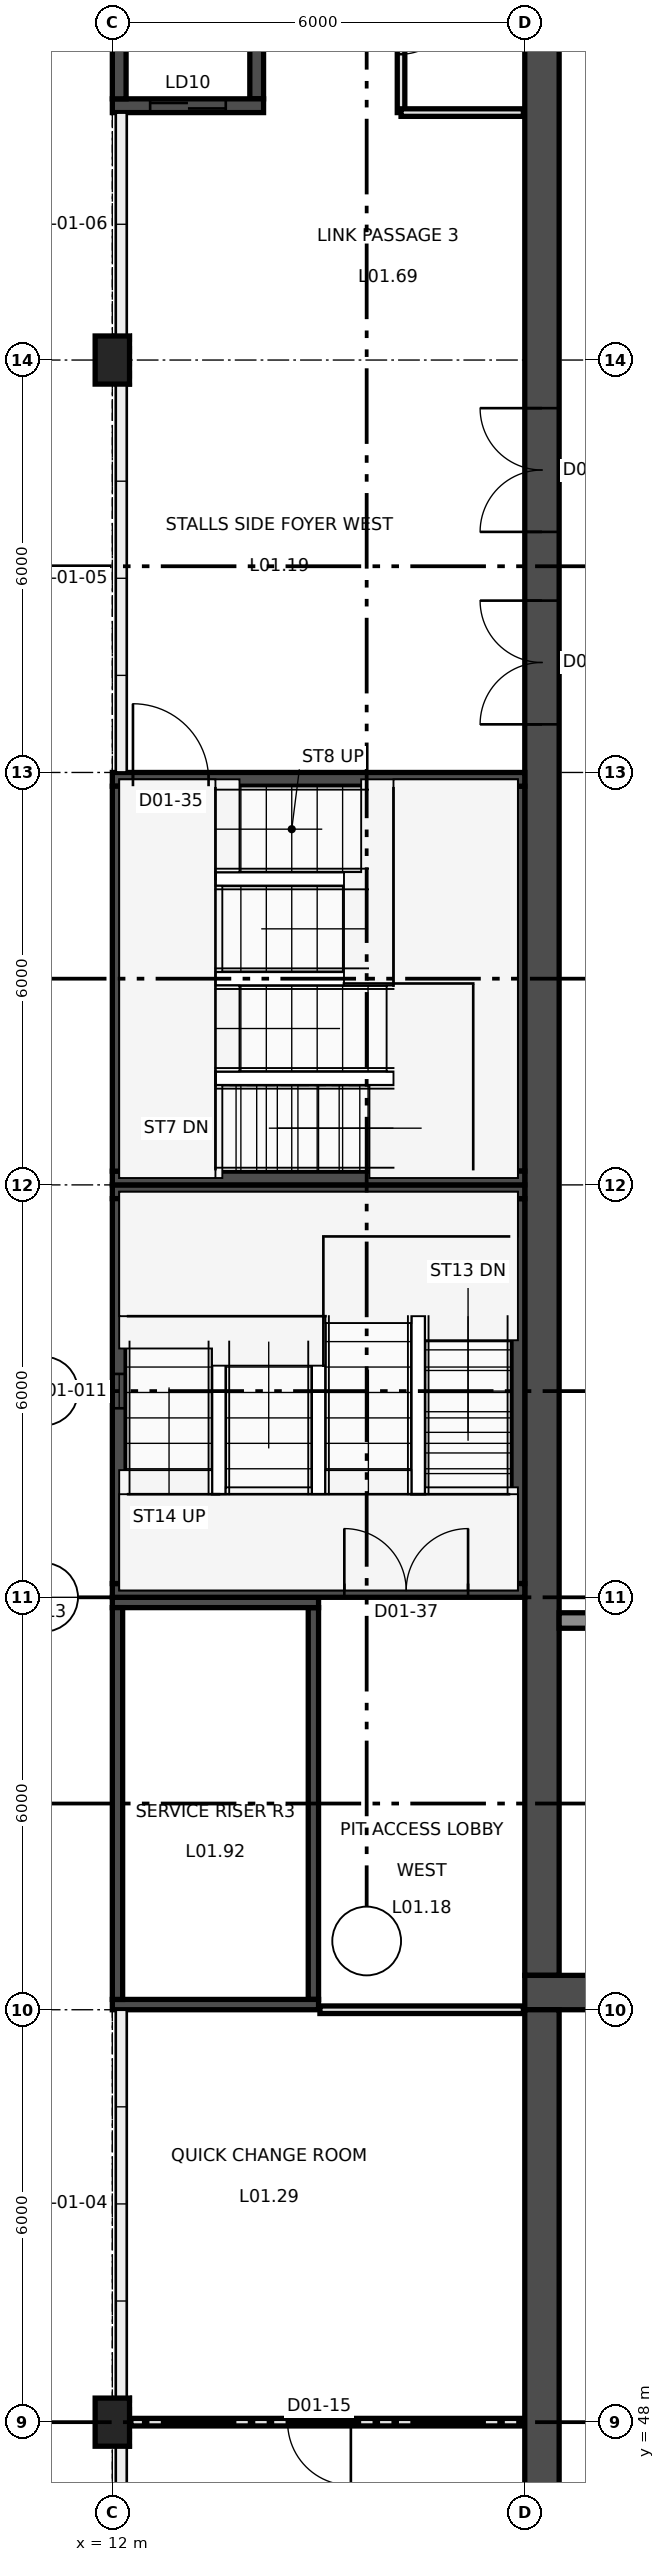
"""IFC4 building model, lengths in metres.
Left out: names, types, materials, properties, quantities, classifications, styles, units other than length and angle.
Written with IfcOpenShell. Run it as: python <this file> out.ifc"""

import sys

from ifc_helpers import new_model, si_unit, direction, frame, frame_2d, origin, origin_2d, place, context, subcontext, project, spatial, rectangle, extrude, element, fill, save


model = new_model("IFC4")
c1 = context("Model", 3, precision=1e-05, world=origin(), true_north=direction((0.0, 1.0)))
c2 = subcontext(c1, "Body", "Model", "MODEL_VIEW")
j1 = project(units=[si_unit("LENGTHUNIT", "METRE"), si_unit("PLANEANGLEUNIT", "RADIAN")], contexts=[c1])
p1 = place(None, origin())
s1 = spatial("IfcSite", under=j1, at=p1, CompositionType="ELEMENT")
p2 = place(p1, origin())
s2 = spatial("IfcBuilding", under=s1, at=p2, CompositionType="ELEMENT")
p3 = place(p2, frame((0.0, 0.0, 7.0)))
s3 = spatial("IfcBuildingStorey", under=s2, at=p3, CompositionType="ELEMENT", Elevation=7.0)
for number, where, z_axis, x_axis in (
    (1, (12.0, 48.0, 0.0), (0.0, 0.0, 1.0), (1.0, 0.0, 0.0)),
    (2, (12.0, 78.0, 0.0), (0.0, 0.0, 1.0), (1.0, 0.0, 0.0)),
):
    element("IfcColumn", number, at=place(p3, frame(where, z_axis=z_axis, x_axis=x_axis)), inside=s3, PredefinedType="COLUMN", context=c2, shape_type="SweptSolid", body=[
        extrude(rectangle(XDim=0.5, YDim=0.7, at=origin_2d()), origin(), (0.0, 0.0, 1.0), 5.0),
    ])
p4 = place(p3, frame((12.0, 71.9, 0.0), z_axis=(0.0, 0.0, 1.0), x_axis=(1.0, 0.0, 0.0)))
e3 = element("IfcWall", 3, at=p4, inside=s3, PredefinedType="SHEAR", context=c2, shape_type="SweptSolid", body=[
    extrude(rectangle(XDim=6.0, YDim=0.2, at=frame_2d((3.0, 0.0))), origin(), (0.0, 0.0, 1.0), 5.0),
])
p5 = place(p4, frame((0.3, 0.0, 0.0)))
e4 = element("IfcOpeningElement", 4, at=p5, cuts=e3, PredefinedType="OPENING", context=c2, shape_type="SweptSolid", body=[
    extrude(rectangle(XDim=1.1, YDim=2.2, at=frame_2d((0.55, 1.1))), frame((0.0, 0.11, 0.0), z_axis=(0.0, -1.0, 0.0), x_axis=(1.0, 0.0, 0.0)), (0.0, 0.0, 1.0), 0.22),
])
p6 = place(p3, frame((12.0, 66.1, 0.0), z_axis=(0.0, 0.0, 1.0), x_axis=(1.0, 0.0, 0.0)))
e5 = element("IfcWall", 5, at=p6, inside=s3, PredefinedType="SHEAR", context=c2, shape_type="SweptSolid", body=[
    extrude(rectangle(XDim=6.0, YDim=0.2, at=frame_2d((3.0, 0.0))), origin(), (0.0, 0.0, 1.0), 5.0),
])
for number, where, z_axis, x_axis in (
    (6, (12.1, 66.2, 0.0), (0.0, 0.0, 1.0), (0.0, 1.0, 0.0)),
    (7, (17.9, 66.2, 0.0), (0.0, 0.0, 1.0), (0.0, 1.0, 0.0)),
):
    element("IfcWall", number, at=place(p3, frame(where, z_axis=z_axis, x_axis=x_axis)), inside=s3, PredefinedType="SHEAR", context=c2, shape_type="SweptSolid", body=[
        extrude(rectangle(XDim=5.6, YDim=0.2, at=frame_2d((2.8, 0.0))), origin(), (0.0, 0.0, 1.0), 5.0),
    ])
p7 = place(p3, frame((12.0, 65.9, 0.0), z_axis=(0.0, 0.0, 1.0), x_axis=(1.0, 0.0, 0.0)))
e8 = element("IfcWall", 8, at=p7, inside=s3, PredefinedType="SHEAR", context=c2, shape_type="SweptSolid", body=[
    extrude(rectangle(XDim=6.0, YDim=0.2, at=frame_2d((3.0, 0.0))), origin(), (0.0, 0.0, 1.0), 5.0),
])
p8 = place(p3, frame((12.0, 60.1, 0.0), z_axis=(0.0, 0.0, 1.0), x_axis=(1.0, 0.0, 0.0)))
e9 = element("IfcWall", 9, at=p8, inside=s3, PredefinedType="SHEAR", context=c2, shape_type="SweptSolid", body=[
    extrude(rectangle(XDim=6.0, YDim=0.2, at=frame_2d((3.0, 0.0))), origin(), (0.0, 0.0, 1.0), 5.0),
])
p9 = place(p8, frame((3.375, 0.0, 0.0)))
e10 = element("IfcOpeningElement", 10, at=p9, cuts=e9, PredefinedType="OPENING", context=c2, shape_type="SweptSolid", body=[
    extrude(rectangle(XDim=1.8, YDim=2.2, at=frame_2d((0.9, 1.1))), frame((0.0, 0.11, 0.0), z_axis=(0.0, -1.0, 0.0), x_axis=(1.0, 0.0, 0.0)), (0.0, 0.0, 1.0), 0.22),
])
p10 = place(p3, frame((12.1, 60.2, 0.0), z_axis=(0.0, 0.0, 1.0), x_axis=(0.0, 1.0, 0.0)))
e11 = element("IfcWall", 11, at=p10, inside=s3, PredefinedType="SHEAR", context=c2, shape_type="SweptSolid", body=[
    extrude(rectangle(XDim=5.6, YDim=0.2, at=frame_2d((2.8, 0.0))), origin(), (0.0, 0.0, 1.0), 5.0),
])
p11 = place(p10, frame((2.55, 0.0, 0.9)))
e12 = element("IfcOpeningElement", 12, at=p11, cuts=e11, PredefinedType="OPENING", context=c2, shape_type="SweptSolid", body=[
    extrude(rectangle(XDim=0.5, YDim=2.1, at=frame_2d((0.25, 1.05))), frame((0.0, 0.11, 0.0), z_axis=(0.0, -1.0, 0.0), x_axis=(1.0, 0.0, 0.0)), (0.0, 0.0, 1.0), 0.22),
])
p12 = place(p3, frame((17.9, 60.2, 0.0), z_axis=(0.0, 0.0, 1.0), x_axis=(0.0, 1.0, 0.0)))
e13 = element("IfcWall", 13, at=p12, inside=s3, PredefinedType="SHEAR", context=c2, shape_type="SweptSolid", body=[
    extrude(rectangle(XDim=5.6, YDim=0.2, at=frame_2d((2.8, 0.0))), origin(), (0.0, 0.0, 1.0), 5.0),
])
p13 = place(p3, frame((12.0, 81.7, 0.0), z_axis=(0.0, 0.0, 1.0), x_axis=(1.0, 0.0, 0.0)))
e14 = element("IfcWall", 14, at=p13, inside=s3, PredefinedType="SHEAR", context=c2, shape_type="SweptSolid", body=[
    extrude(rectangle(XDim=2.2, YDim=0.2, at=frame_2d((1.1, 0.0))), origin(), (0.0, 0.0, 1.0), 5.0),
])
p14 = place(p13, frame((0.55, 0.0, 0.0)))
e15 = element("IfcOpeningElement", 15, at=p14, cuts=e14, PredefinedType="OPENING", context=c2, shape_type="SweptSolid", body=[
    extrude(rectangle(XDim=1.1, YDim=2.1, at=frame_2d((0.55, 1.05))), frame((0.0, 0.11, 0.0), z_axis=(0.0, -1.0, 0.0), x_axis=(1.0, 0.0, 0.0)), (0.0, 0.0, 1.0), 0.22),
])
for number, where, z_axis, x_axis in (
    (16, (12.1, 81.8, 0.0), (0.0, 0.0, 1.0), (0.0, 1.0, 0.0)),
    (17, (14.1, 81.8, 0.0), (0.0, 0.0, 1.0), (0.0, 1.0, 0.0)),
):
    element("IfcWall", number, at=place(p3, frame(where, z_axis=z_axis, x_axis=x_axis)), inside=s3, PredefinedType="SHEAR", context=c2, shape_type="SweptSolid", body=[
        extrude(rectangle(XDim=2.0, YDim=0.2, at=frame_2d((1.0, 0.0))), origin(), (0.0, 0.0, 1.0), 5.0),
    ])
for number, where, z_axis, x_axis in (
    (18, (12.0, 59.925, 0.0), (0.0, 0.0, 1.0), (1.0, 0.0, 0.0)),
    (19, (12.0, 54.075, 0.0), (0.0, 0.0, 1.0), (1.0, 0.0, 0.0)),
):
    element("IfcWall", number, at=place(p3, frame(where, z_axis=z_axis, x_axis=x_axis)), inside=s3, PredefinedType="SHEAR", context=c2, shape_type="SweptSolid", body=[
        extrude(rectangle(XDim=3.0, YDim=0.15, at=frame_2d((1.5, 0.0))), origin(), (0.0, 0.0, 1.0), 5.0),
    ])
for number, where, z_axis, x_axis in (
    (20, (12.075, 54.15, 0.0), (0.0, 0.0, 1.0), (0.0, 1.0, 0.0)),
    (21, (14.925, 54.15, 0.0), (0.0, 0.0, 1.0), (0.0, 1.0, 0.0)),
):
    element("IfcWall", number, at=place(p3, frame(where, z_axis=z_axis, x_axis=x_axis)), inside=s3, PredefinedType="SHEAR", context=c2, shape_type="SweptSolid", body=[
        extrude(rectangle(XDim=5.7, YDim=0.15, at=frame_2d((2.85, 0.0))), origin(), (0.0, 0.0, 1.0), 5.0),
    ])
p15 = place(p3, frame((18.25, 54.5, 0.0), z_axis=(0.0, 0.0, 1.0), x_axis=(0.0, 1.0, 0.0)))
e22 = element("IfcWall", 22, at=p15, inside=s3, PredefinedType="SHEAR", context=c2, shape_type="SweptSolid", body=[
    extrude(rectangle(XDim=35.5, YDim=0.5, at=frame_2d((17.75, 0.0))), origin(), (0.0, 0.0, 1.0), 5.0),
])
p16 = place(p15, frame((18.2, 0.0, 0.0)))
e23 = element("IfcOpeningElement", 23, at=p16, cuts=e22, PredefinedType="OPENING", context=c2, shape_type="SweptSolid", body=[
    extrude(rectangle(XDim=1.8, YDim=2.4, at=frame_2d((0.9, 1.2))), frame((0.0, 0.26, 0.0), z_axis=(0.0, -1.0, 0.0), x_axis=(1.0, 0.0, 0.0)), (0.0, 0.0, 1.0), 0.52),
])
p17 = place(p15, frame((21.0, 0.0, 0.0)))
e24 = element("IfcOpeningElement", 24, at=p17, cuts=e22, PredefinedType="OPENING", context=c2, shape_type="SweptSolid", body=[
    extrude(rectangle(XDim=1.8, YDim=2.4, at=frame_2d((0.9, 1.2))), frame((0.0, 0.26, 0.0), z_axis=(0.0, -1.0, 0.0), x_axis=(1.0, 0.0, 0.0)), (0.0, 0.0, 1.0), 0.52),
])
p18 = place(p3, frame((18.25, 30.0, 0.0), z_axis=(0.0, 0.0, 1.0), x_axis=(0.0, 1.0, 0.0)))
e25 = element("IfcWall", 25, at=p18, inside=s3, PredefinedType="SHEAR", context=c2, shape_type="SweptSolid", body=[
    extrude(rectangle(XDim=24.0, YDim=0.5, at=frame_2d((12.0, 0.0))), origin(), (0.0, 0.0, 1.0), 5.0),
])
p19 = place(p18, frame((2.25, 0.0, 0.0)))
e26 = element("IfcOpeningElement", 26, at=p19, cuts=e25, PredefinedType="OPENING", context=c2, shape_type="SweptSolid", body=[
    extrude(rectangle(XDim=1.5, YDim=2.1, at=frame_2d((0.75, 1.05))), frame((0.0, 0.26, 0.0), z_axis=(0.0, -1.0, 0.0), x_axis=(1.0, 0.0, 0.0)), (0.0, 0.0, 1.0), 0.52),
])
p20 = place(p18, frame((14.25, 0.0, 0.0)))
e27 = element("IfcOpeningElement", 27, at=p20, cuts=e25, PredefinedType="OPENING", context=c2, shape_type="SweptSolid", body=[
    extrude(rectangle(XDim=1.5, YDim=2.1, at=frame_2d((0.75, 1.05))), frame((0.0, 0.26, 0.0), z_axis=(0.0, -1.0, 0.0), x_axis=(1.0, 0.0, 0.0)), (0.0, 0.0, 1.0), 0.52),
])
p21 = place(p3, frame((18.0, 54.25, 0.0), z_axis=(0.0, 0.0, 1.0), x_axis=(1.0, 0.0, 0.0)))
e28 = element("IfcWall", 28, at=p21, inside=s3, PredefinedType="SHEAR", context=c2, shape_type="SweptSolid", body=[
    extrude(rectangle(XDim=8.0, YDim=0.5, at=frame_2d((4.0, 0.0))), origin(), (0.0, 0.0, 1.0), 5.0),
])
p22 = place(p3, frame((18.5, 59.663, -1.238), z_axis=(0.0, 0.0, 1.0), x_axis=(1.0, 0.0, 0.0)))
e29 = element("IfcWall", 29, at=p22, inside=s3, PredefinedType="SOLIDWALL", context=c2, shape_type="SweptSolid", body=[
    extrude(rectangle(XDim=29.0, YDim=0.225, at=frame_2d((14.5, 0.0))), origin(), (0.0, 0.0, 1.0), 1.1),
])
p23 = place(p3, frame((12.27, 48.0, 0.0), z_axis=(0.0, 0.0, 1.0), x_axis=(1.0, 0.0, 0.0)))
e30 = element("IfcWall", 30, at=p23, inside=s3, PredefinedType="PARTITIONING", context=c2, shape_type="SweptSolid", body=[
    extrude(rectangle(XDim=5.71, YDim=0.11, at=frame_2d((2.855, 0.0))), origin(), (0.0, 0.0, 1.0), 4.05),
])
p24 = place(p23, frame((2.28, 0.0, 0.0)))
e31 = element("IfcOpeningElement", 31, at=p24, cuts=e30, PredefinedType="OPENING", context=c2, shape_type="SweptSolid", body=[
    extrude(rectangle(XDim=0.92, YDim=2.04, at=frame_2d((0.46, 1.02))), frame((0.0, 0.065, 0.0), z_axis=(0.0, -1.0, 0.0), x_axis=(1.0, 0.0, 0.0)), (0.0, 0.0, 1.0), 0.13),
])
p25 = place(p3, frame((15.02, 54.0, 0.0), z_axis=(0.0, 0.0, 1.0), x_axis=(1.0, 0.0, 0.0)))
e32 = element("IfcWall", 32, at=p25, inside=s3, PredefinedType="PARTITIONING", context=c2, shape_type="SweptSolid", body=[
    extrude(rectangle(XDim=2.96, YDim=0.11, at=frame_2d((1.48, 0.0))), origin(), (0.0, 0.0, 1.0), 4.15),
])
p26 = place(p3, frame((16.2, 81.6, 0.0), z_axis=(0.0, 0.0, 1.0), x_axis=(0.0, 1.0, 0.0)))
e33 = element("IfcWall", 33, at=p26, inside=s3, PredefinedType="PARTITIONING", context=c2, shape_type="SweptSolid", body=[
    extrude(rectangle(XDim=2.4, YDim=0.11, at=frame_2d((1.2, 0.0))), origin(), (0.0, 0.0, 1.0), 4.15),
])
p27 = place(p26, frame((0.85, 0.0, 0.0)))
e34 = element("IfcOpeningElement", 34, at=p27, cuts=e33, PredefinedType="OPENING", context=c2, shape_type="SweptSolid", body=[
    extrude(rectangle(XDim=0.75, YDim=2.04, at=frame_2d((0.375, 1.02))), frame((0.0, 0.065, 0.0), z_axis=(0.0, -1.0, 0.0), x_axis=(1.0, 0.0, 0.0)), (0.0, 0.0, 1.0), 0.13),
])
p28 = place(p3, frame((16.2, 81.6, 0.0), z_axis=(0.0, 0.0, 1.0), x_axis=(1.0, 0.0, 0.0)))
e35 = element("IfcWall", 35, at=p28, inside=s3, PredefinedType="PARTITIONING", context=c2, shape_type="SweptSolid", body=[
    extrude(rectangle(XDim=1.78, YDim=0.11, at=frame_2d((0.89, 0.0))), origin(), (0.0, 0.0, 1.0), 4.75),
])
p29 = place(p11, origin())
e36 = element("IfcWindow", 36, at=p29, inside=s3, PartitioningType="SINGLE_PANEL", PredefinedType="WINDOW", context=c2, shape_type="SweptSolid", body=[
    extrude(rectangle(XDim=0.5, YDim=2.1, at=frame_2d((0.25, 1.05))), frame((0.0, 0.03, 0.0), z_axis=(0.0, -1.0, 0.0), x_axis=(1.0, 0.0, 0.0)), (0.0, 0.0, 1.0), 0.06),
])
fill(e12, e36)
p30 = place(p24, origin())
e37 = element("IfcDoor", 37, at=p30, inside=s3, OperationType="SINGLE_SWING_RIGHT", PredefinedType="DOOR", context=c2, shape_type="SweptSolid", body=[
    extrude(rectangle(XDim=0.92, YDim=2.04, at=frame_2d((0.46, 1.02))), frame((0.0, 0.025, 0.0), z_axis=(0.0, -1.0, 0.0), x_axis=(1.0, 0.0, 0.0)), (0.0, 0.0, 1.0), 0.05),
])
fill(e31, e37)
p31 = place(p5, frame((1.1, 0.0, 0.0), z_axis=(0.0, 0.0, 1.0), x_axis=(-1.0, 0.0, 0.0)))
e38 = element("IfcDoor", 38, at=p31, inside=s3, OperationType="SINGLE_SWING_LEFT", PredefinedType="DOOR", context=c2, shape_type="SweptSolid", body=[
    extrude(rectangle(XDim=1.1, YDim=2.2, at=frame_2d((0.55, 1.1))), frame((0.0, 0.025, 0.0), z_axis=(0.0, -1.0, 0.0), x_axis=(1.0, 0.0, 0.0)), (0.0, 0.0, 1.0), 0.05),
])
fill(e4, e38)
p32 = place(p9, origin())
e39 = element("IfcDoor", 39, at=p32, inside=s3, OperationType="DOUBLE_DOOR_SINGLE_SWING", PredefinedType="DOOR", context=c2, shape_type="SweptSolid", body=[
    extrude(rectangle(XDim=1.8, YDim=2.2, at=frame_2d((0.9, 1.1))), frame((0.0, 0.025, 0.0), z_axis=(0.0, -1.0, 0.0), x_axis=(1.0, 0.0, 0.0)), (0.0, 0.0, 1.0), 0.05),
])
fill(e10, e39)
p33 = place(p27, frame((0.75, 0.0, 0.0), z_axis=(0.0, 0.0, 1.0), x_axis=(-1.0, 0.0, 0.0)))
e40 = element("IfcDoor", 40, at=p33, inside=s3, OperationType="SINGLE_SWING_RIGHT", PredefinedType="DOOR", context=c2, shape_type="SweptSolid", body=[
    extrude(rectangle(XDim=0.75, YDim=2.04, at=frame_2d((0.375, 1.02))), frame((0.0, 0.025, 0.0), z_axis=(0.0, -1.0, 0.0), x_axis=(1.0, 0.0, 0.0)), (0.0, 0.0, 1.0), 0.05),
])
fill(e34, e40)
p34 = place(p16, origin())
e41 = element("IfcDoor", 41, at=p34, inside=s3, OperationType="DOUBLE_DOOR_SINGLE_SWING", PredefinedType="DOOR", context=c2, shape_type="SweptSolid", body=[
    extrude(rectangle(XDim=1.8, YDim=2.4, at=frame_2d((0.9, 1.2))), frame((0.0, 0.025, 0.0), z_axis=(0.0, -1.0, 0.0), x_axis=(1.0, 0.0, 0.0)), (0.0, 0.0, 1.0), 0.05),
])
fill(e23, e41)
p35 = place(p17, origin())
e42 = element("IfcDoor", 42, at=p35, inside=s3, OperationType="DOUBLE_DOOR_SINGLE_SWING", PredefinedType="DOOR", context=c2, shape_type="SweptSolid", body=[
    extrude(rectangle(XDim=1.8, YDim=2.4, at=frame_2d((0.9, 1.2))), frame((0.0, 0.025, 0.0), z_axis=(0.0, -1.0, 0.0), x_axis=(1.0, 0.0, 0.0)), (0.0, 0.0, 1.0), 0.05),
])
fill(e24, e42)
p36 = place(p14, origin())
e43 = element("IfcDoor", 43, at=p36, inside=s3, OperationType="DOUBLE_DOOR_SLIDING", PredefinedType="DOOR", context=c2, shape_type="SweptSolid", body=[
    extrude(rectangle(XDim=1.1, YDim=2.1, at=frame_2d((0.55, 1.05))), frame((0.0, 0.025, 0.0), z_axis=(0.0, -1.0, 0.0), x_axis=(1.0, 0.0, 0.0)), (0.0, 0.0, 1.0), 0.05),
])
fill(e15, e43)
save(model, sys.argv[1])
